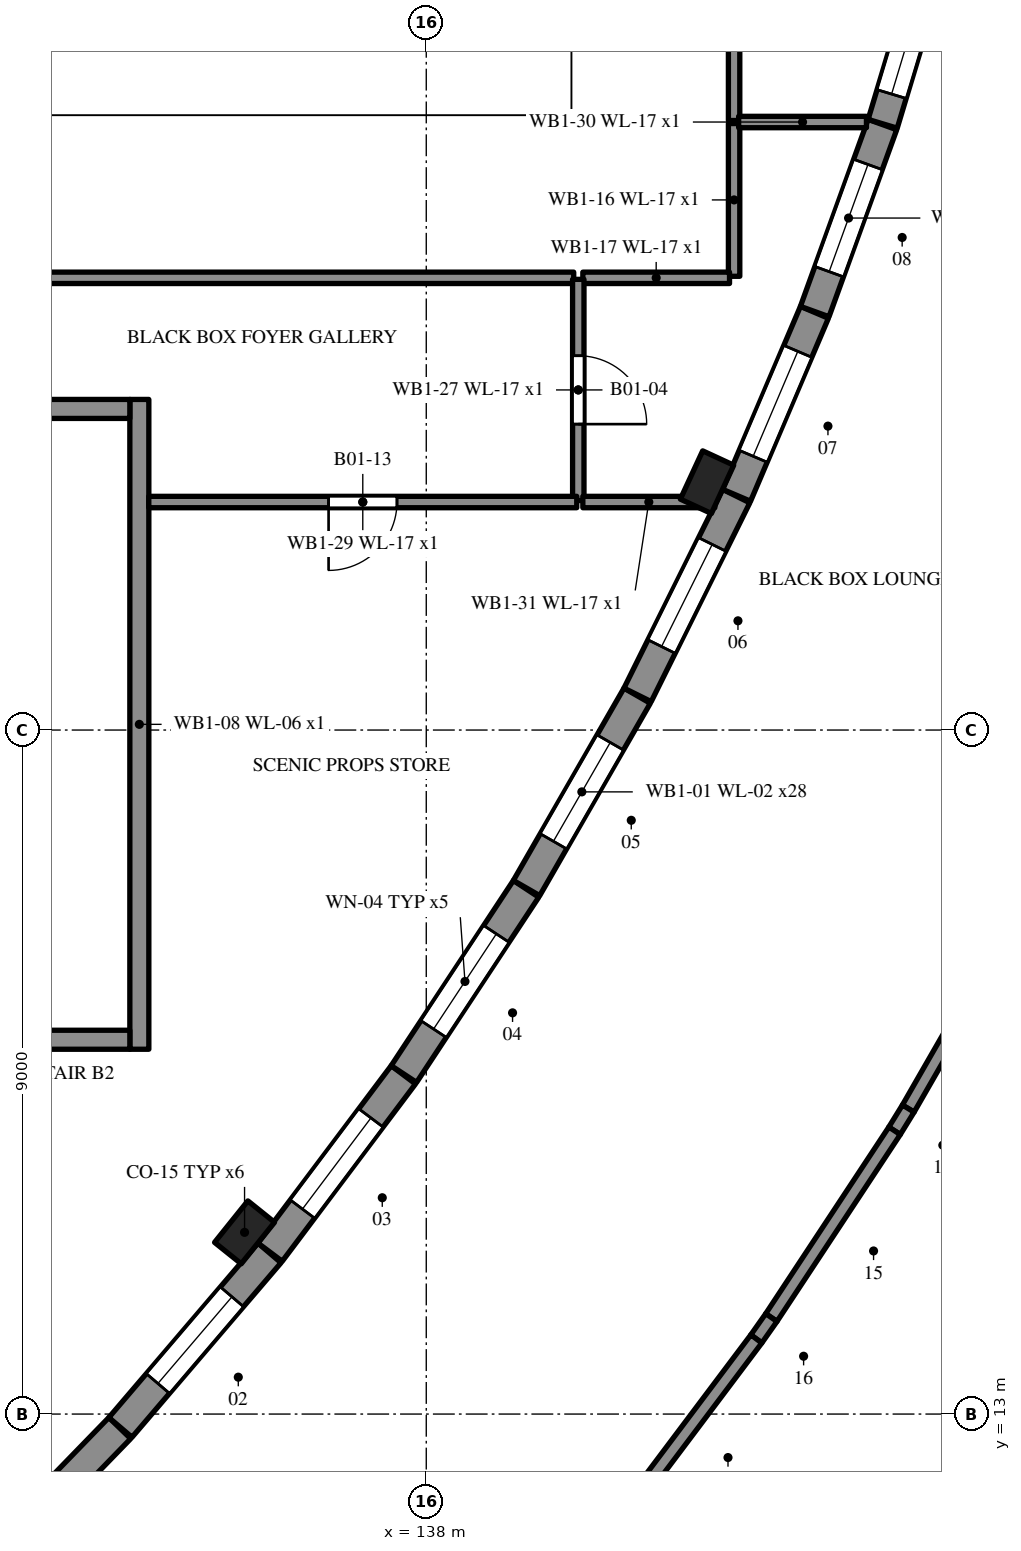
"""IFC4 building model, lengths in metres.
Left out: names, types, materials, properties, quantities, classifications, styles, units other than length and angle.
Written with IfcOpenShell. Run it as: python <this file> out.ifc"""

import sys

from ifc_helpers import new_model, si_unit, direction, frame, frame_2d, origin, origin_2d, place, context, subcontext, project, spatial, rectangle, extrude, element, fill, save


model = new_model("IFC4")
c1 = context("Model", 3, precision=1e-05, world=origin(), true_north=direction((0.0, 1.0)))
c2 = subcontext(c1, "Body", "Model", "MODEL_VIEW")
j1 = project(units=[si_unit("LENGTHUNIT", "METRE"), si_unit("PLANEANGLEUNIT", "RADIAN")], contexts=[c1])
p1 = place(None, origin())
s1 = spatial("IfcSite", under=j1, at=p1, CompositionType="ELEMENT")
p2 = place(p1, origin())
s2 = spatial("IfcBuilding", under=s1, at=p2, CompositionType="ELEMENT")
p3 = place(p2, frame((0.0, 0.0, 5.4)))
s3 = spatial("IfcBuildingStorey", under=s2, at=p3, CompositionType="ELEMENT", Elevation=5.4)
p4 = place(p3, frame((145.809, 19.572, 0.0), z_axis=(0.0, 0.0, 1.0), x_axis=(-0.498441518108, -0.866923325921, 0.0)))
e1 = element("IfcWall", 1, at=p4, inside=s3, PredefinedType="PARAPET", context=c2, shape_type="SweptSolid", body=[
    extrude(rectangle(XDim=2.944, YDim=0.18, at=frame_2d((1.472, 0.0))), origin(), (0.0, 0.0, 1.0), 0.7),
])
p5 = place(p3, frame((144.341, 17.02, 0.0), z_axis=(0.0, 0.0, 1.0), x_axis=(-0.52449389471, -0.851414208486, 0.0)))
e2 = element("IfcWall", 2, at=p5, inside=s3, PredefinedType="PARAPET", context=c2, shape_type="SweptSolid", body=[
    extrude(rectangle(XDim=0.344, YDim=0.18, at=frame_2d((0.172, 0.0))), origin(), (0.0, 0.0, 1.0), 0.7),
])
p6 = place(p3, frame((144.161, 16.727, 0.0), z_axis=(0.0, 0.0, 1.0), x_axis=(-0.550616879534, -0.834758079908, 0.0)))
e3 = element("IfcWall", 3, at=p6, inside=s3, PredefinedType="PARAPET", context=c2, shape_type="SweptSolid", body=[
    extrude(rectangle(XDim=2.944, YDim=0.18, at=frame_2d((1.472, 0.0))), origin(), (0.0, 0.0, 1.0), 0.7),
])
p7 = place(p3, frame((142.54, 14.27, 0.0), z_axis=(0.0, 0.0, 1.0), x_axis=(-0.576320440774, -0.817223806277, 0.0)))
e4 = element("IfcWall", 4, at=p7, inside=s3, PredefinedType="PARAPET", context=c2, shape_type="SweptSolid", body=[
    extrude(rectangle(XDim=0.344, YDim=0.18, at=frame_2d((0.172, 0.0))), origin(), (0.0, 0.0, 1.0), 0.7),
])
p8 = place(p3, frame((142.342, 13.989, 0.0), z_axis=(0.0, 0.0, 1.0), x_axis=(-0.600729616459, -0.799452267437, 0.0)))
e5 = element("IfcWall", 5, at=p8, inside=s3, PredefinedType="PARAPET", context=c2, shape_type="SweptSolid", body=[
    extrude(rectangle(XDim=2.944, YDim=0.18, at=frame_2d((1.472, 0.0))), origin(), (0.0, 0.0, 1.0), 0.7),
])
p9 = place(p3, frame((132.144, 10.935, 0.0), z_axis=(0.0, 0.0, 1.0), x_axis=(0.696353968975, 0.71769850905, 0.0)))
e6 = element("IfcWall", 6, at=p9, inside=s3, PredefinedType="SOLIDWALL", context=c2, shape_type="SweptSolid", body=[
    extrude(rectangle(XDim=2.619, YDim=0.4, at=frame_2d((1.31, 0.0))), origin(), (0.0, 0.0, 1.0), 4.8),
])
p10 = place(p3, frame((133.976, 12.824, 0.0), z_axis=(0.0, 0.0, 1.0), x_axis=(0.649458578854, 0.760396971557, 0.0)))
e7 = element("IfcWall", 7, at=p10, inside=s3, PredefinedType="SOLIDWALL", context=c2, shape_type="SweptSolid", body=[
    extrude(rectangle(XDim=3.019, YDim=0.4, at=frame_2d((1.51, 0.0))), origin(), (0.0, 0.0, 1.0), 4.8),
])
p11 = place(p10, frame((0.76, 0.0, 2.4)))
e8 = element("IfcOpeningElement", 8, at=p11, cuts=e7, PredefinedType="OPENING", context=c2, shape_type="SweptSolid", body=[
    extrude(rectangle(XDim=1.5, YDim=0.9, at=frame_2d((0.75, 0.45))), frame((0.0, 0.21, 0.0), z_axis=(0.0, -1.0, 0.0), x_axis=(1.0, 0.0, 0.0)), (0.0, 0.0, 1.0), 0.42),
])
p12 = place(p3, frame((135.945, 15.13, 0.0), z_axis=(0.0, 0.0, 1.0), x_axis=(0.600829330321, 0.799377330068, 0.0)))
e9 = element("IfcWall", 9, at=p12, inside=s3, PredefinedType="SOLIDWALL", context=c2, shape_type="SweptSolid", body=[
    extrude(rectangle(XDim=2.919, YDim=0.4, at=frame_2d((1.459, 0.0))), origin(), (0.0, 0.0, 1.0), 4.8),
])
p13 = place(p12, frame((0.71, 0.0, 2.4)))
e10 = element("IfcOpeningElement", 10, at=p13, cuts=e9, PredefinedType="OPENING", context=c2, shape_type="SweptSolid", body=[
    extrude(rectangle(XDim=1.5, YDim=0.9, at=frame_2d((0.75, 0.45))), frame((0.0, 0.21, 0.0), z_axis=(0.0, -1.0, 0.0), x_axis=(1.0, 0.0, 0.0)), (0.0, 0.0, 1.0), 0.42),
])
p14 = place(p3, frame((137.706, 17.474, 0.0), z_axis=(0.0, 0.0, 1.0), x_axis=(0.550602185206, 0.834767772285, 0.0)))
e11 = element("IfcWall", 11, at=p14, inside=s3, PredefinedType="SOLIDWALL", context=c2, shape_type="SweptSolid", body=[
    extrude(rectangle(XDim=2.919, YDim=0.4, at=frame_2d((1.46, 0.0))), origin(), (0.0, 0.0, 1.0), 4.8),
])
p15 = place(p14, frame((0.71, 0.0, 2.4)))
e12 = element("IfcOpeningElement", 12, at=p15, cuts=e11, PredefinedType="OPENING", context=c2, shape_type="SweptSolid", body=[
    extrude(rectangle(XDim=1.5, YDim=0.9, at=frame_2d((0.75, 0.45))), frame((0.0, 0.21, 0.0), z_axis=(0.0, -1.0, 0.0), x_axis=(1.0, 0.0, 0.0)), (0.0, 0.0, 1.0), 0.42),
])
p16 = place(p3, frame((139.319, 19.921, 0.0), z_axis=(0.0, 0.0, 1.0), x_axis=(0.498406705095, 0.866943340892, 0.0)))
e13 = element("IfcWall", 13, at=p16, inside=s3, PredefinedType="SOLIDWALL", context=c2, shape_type="SweptSolid", body=[
    extrude(rectangle(XDim=2.919, YDim=0.4, at=frame_2d((1.46, 0.0))), origin(), (0.0, 0.0, 1.0), 4.8),
])
p17 = place(p16, frame((0.71, 0.0, 2.4)))
e14 = element("IfcOpeningElement", 14, at=p17, cuts=e13, PredefinedType="OPENING", context=c2, shape_type="SweptSolid", body=[
    extrude(rectangle(XDim=1.5, YDim=0.9, at=frame_2d((0.75, 0.45))), frame((0.0, 0.21, 0.0), z_axis=(0.0, -1.0, 0.0), x_axis=(1.0, 0.0, 0.0)), (0.0, 0.0, 1.0), 0.42),
])
p18 = place(p3, frame((140.78, 22.463, 0.0), z_axis=(0.0, 0.0, 1.0), x_axis=(0.44433489597, 0.895860759395, 0.0)))
e15 = element("IfcWall", 15, at=p18, inside=s3, PredefinedType="SOLIDWALL", context=c2, shape_type="SweptSolid", body=[
    extrude(rectangle(XDim=2.92, YDim=0.4, at=frame_2d((1.46, 0.0))), origin(), (0.0, 0.0, 1.0), 4.8),
])
p19 = place(p18, frame((0.71, 0.0, 2.4)))
e16 = element("IfcOpeningElement", 16, at=p19, cuts=e15, PredefinedType="OPENING", context=c2, shape_type="SweptSolid", body=[
    extrude(rectangle(XDim=1.5, YDim=0.9, at=frame_2d((0.75, 0.45))), frame((0.0, 0.21, 0.0), z_axis=(0.0, -1.0, 0.0), x_axis=(1.0, 0.0, 0.0)), (0.0, 0.0, 1.0), 0.42),
])
p20 = place(p3, frame((142.083, 25.089, 0.0), z_axis=(0.0, 0.0, 1.0), x_axis=(0.391529943778, 0.920165367271, 0.0)))
e17 = element("IfcWall", 17, at=p20, inside=s3, PredefinedType="SOLIDWALL", context=c2, shape_type="SweptSolid", body=[
    extrude(rectangle(XDim=2.616, YDim=0.4, at=frame_2d((1.308, 0.0))), origin(), (0.0, 0.0, 1.0), 4.8),
])
p21 = place(p20, frame((0.558, 0.0, 0.9)))
e18 = element("IfcOpeningElement", 18, at=p21, cuts=e17, PredefinedType="OPENING", context=c2, shape_type="SweptSolid", body=[
    extrude(rectangle(XDim=1.5, YDim=2.1, at=frame_2d((0.75, 1.05))), frame((0.0, 0.21, 0.0), z_axis=(0.0, -1.0, 0.0), x_axis=(1.0, 0.0, 0.0)), (0.0, 0.0, 1.0), 0.42),
])
p22 = place(p3, frame((143.111, 27.506, 0.0), z_axis=(0.0, 0.0, 1.0), x_axis=(0.340394146267, 0.940282843184, 0.0)))
e19 = element("IfcWall", 19, at=p22, inside=s3, PredefinedType="SOLIDWALL", context=c2, shape_type="SweptSolid", body=[
    extrude(rectangle(XDim=2.616, YDim=0.4, at=frame_2d((1.308, 0.0))), origin(), (0.0, 0.0, 1.0), 4.8),
])
p23 = place(p22, frame((0.558, 0.0, 0.9)))
e20 = element("IfcOpeningElement", 20, at=p23, cuts=e19, PredefinedType="OPENING", context=c2, shape_type="SweptSolid", body=[
    extrude(rectangle(XDim=1.5, YDim=2.1, at=frame_2d((0.75, 1.05))), frame((0.0, 0.21, 0.0), z_axis=(0.0, -1.0, 0.0), x_axis=(1.0, 0.0, 0.0)), (0.0, 0.0, 1.0), 0.42),
])
p24 = place(p3, frame((144.005, 29.977, 0.0), z_axis=(0.0, 0.0, 1.0), x_axis=(0.288212317298, 0.957566530408, 0.0)))
e21 = element("IfcWall", 21, at=p24, inside=s3, PredefinedType="SOLIDWALL", context=c2, shape_type="SweptSolid", body=[
    extrude(rectangle(XDim=2.617, YDim=0.4, at=frame_2d((1.308, 0.0))), origin(), (0.0, 0.0, 1.0), 4.8),
])
p25 = place(p24, frame((0.408, 0.0, 0.9)))
e22 = element("IfcOpeningElement", 22, at=p25, cuts=e21, PredefinedType="OPENING", context=c2, shape_type="SweptSolid", body=[
    extrude(rectangle(XDim=1.8, YDim=2.1, at=frame_2d((0.9, 1.05))), frame((0.0, 0.21, 0.0), z_axis=(0.0, -1.0, 0.0), x_axis=(1.0, 0.0, 0.0)), (0.0, 0.0, 1.0), 0.42),
])
for number, where, z_axis, x_axis in (
    (23, (135.609, 15.391, 0.0), (0.0, 0.0, 1.0), (0.626, 0.78, 0.0)),
    (24, (141.694, 25.261, 0.0), (0.0, 0.0, 1.0), (0.42, 0.908, 0.0)),
):
    element("IfcColumn", number, at=place(p3, frame(where, z_axis=z_axis, x_axis=x_axis)), inside=s3, PredefinedType="PILASTER", context=c2, shape_type="SweptSolid", body=[
        extrude(rectangle(XDim=0.7, YDim=0.45, at=origin_2d()), origin(), (0.0, 0.0, 1.0), 4.8),
    ])
p26 = place(p3, frame((134.225, 17.8, 0.0), z_axis=(0.0, 0.0, 1.0), x_axis=(0.0, 1.0, 0.0)))
e25 = element("IfcWall", 25, at=p26, inside=s3, PredefinedType="SHEAR", context=c2, shape_type="SweptSolid", body=[
    extrude(rectangle(XDim=8.55, YDim=0.25, at=frame_2d((4.275, 0.0))), origin(), (0.0, 0.0, 1.0), 4.5),
])
p27 = place(p3, frame((134.1, 17.925, 0.0), z_axis=(0.0, 0.0, 1.0), x_axis=(-1.0, 0.0, 0.0)))
e26 = element("IfcWall", 26, at=p27, inside=s3, PredefinedType="SHEAR", context=c2, shape_type="SweptSolid", body=[
    extrude(rectangle(XDim=4.2, YDim=0.25, at=frame_2d((2.1, 0.0))), origin(), (0.0, 0.0, 1.0), 4.5),
])
p28 = place(p3, frame((129.9, 26.225, 0.0), z_axis=(0.0, 0.0, 1.0), x_axis=(1.0, 0.0, 0.0)))
e27 = element("IfcWall", 27, at=p28, inside=s3, PredefinedType="SHEAR", context=c2, shape_type="SweptSolid", body=[
    extrude(rectangle(XDim=4.2, YDim=0.25, at=frame_2d((2.1, 0.0))), origin(), (0.0, 0.0, 1.0), 4.5),
])
p29 = place(p28, frame((1.55, 0.0, 0.0)))
e28 = element("IfcOpeningElement", 28, at=p29, cuts=e27, PredefinedType="OPENING", context=c2, shape_type="SweptSolid", body=[
    extrude(rectangle(XDim=1.1, YDim=2.1, at=frame_2d((0.55, 1.05))), frame((0.0, 0.135, 0.0), z_axis=(0.0, -1.0, 0.0), x_axis=(1.0, 0.0, 0.0)), (0.0, 0.0, 1.0), 0.27),
])
p30 = place(p3, frame((139.94, 27.95, 0.0), z_axis=(0.0, 0.0, 1.0), x_axis=(-1.0, 0.0, 0.0)))
e29 = element("IfcWall", 29, at=p30, inside=s3, PredefinedType="PARTITIONING", context=c2, shape_type="SweptSolid", body=[
    extrude(rectangle(XDim=15.92, YDim=0.15, at=frame_2d((7.96, 0.0))), origin(), (0.0, 0.0, 1.0), 4.5),
])
p31 = place(p3, frame((142.05, 29.98, 0.0), z_axis=(0.0, 0.0, 1.0), x_axis=(0.0, -1.0, 0.0)))
e30 = element("IfcWall", 30, at=p31, inside=s3, PredefinedType="PARTITIONING", context=c2, shape_type="SweptSolid", body=[
    extrude(rectangle(XDim=2.01, YDim=0.15, at=frame_2d((1.005, 0.0))), origin(), (0.0, 0.0, 1.0), 4.5),
])
p32 = place(p3, frame((141.99, 27.95, 0.0), z_axis=(0.0, 0.0, 1.0), x_axis=(-1.0, 0.0, 0.0)))
e31 = element("IfcWall", 31, at=p32, inside=s3, PredefinedType="PARTITIONING", context=c2, shape_type="SweptSolid", body=[
    extrude(rectangle(XDim=1.93, YDim=0.15, at=frame_2d((0.965, 0.0))), origin(), (0.0, 0.0, 1.0), 4.5),
])
p33 = place(p3, frame((142.05, 36.98, 0.0), z_axis=(0.0, 0.0, 1.0), x_axis=(0.0, -1.0, 0.0)))
e32 = element("IfcWall", 32, at=p33, inside=s3, PredefinedType="PARTITIONING", context=c2, shape_type="SweptSolid", body=[
    extrude(rectangle(XDim=6.96, YDim=0.15, at=frame_2d((3.48, 0.0))), origin(), (0.0, 0.0, 1.0), 4.5),
])
p34 = place(p33, frame((3.03, 0.0, 0.0)))
e33 = element("IfcOpeningElement", 33, at=p34, cuts=e32, PredefinedType="OPENING", context=c2, shape_type="SweptSolid", body=[
    extrude(rectangle(XDim=0.9, YDim=2.1, at=frame_2d((0.45, 1.05))), frame((0.0, 0.085, 0.0), z_axis=(0.0, -1.0, 0.0), x_axis=(1.0, 0.0, 0.0)), (0.0, 0.0, 1.0), 0.17),
])
p35 = place(p3, frame((140.0, 27.93, 0.0), z_axis=(0.0, 0.0, 1.0), x_axis=(0.0, -1.0, 0.0)))
e34 = element("IfcWall", 34, at=p35, inside=s3, PredefinedType="PARTITIONING", context=c2, shape_type="SweptSolid", body=[
    extrude(rectangle(XDim=2.91, YDim=0.15, at=frame_2d((1.455, 0.0))), origin(), (0.0, 0.0, 1.0), 4.5),
])
p36 = place(p35, frame((1.005, 0.0, 0.0)))
e35 = element("IfcOpeningElement", 35, at=p36, cuts=e34, PredefinedType="OPENING", context=c2, shape_type="SweptSolid", body=[
    extrude(rectangle(XDim=0.9, YDim=2.1, at=frame_2d((0.45, 1.05))), frame((0.0, 0.085, 0.0), z_axis=(0.0, -1.0, 0.0), x_axis=(1.0, 0.0, 0.0)), (0.0, 0.0, 1.0), 0.17),
])
p37 = place(p3, frame((139.98, 25.0, 0.0), z_axis=(0.0, 0.0, 1.0), x_axis=(-1.0, 0.0, 0.0)))
e36 = element("IfcWall", 36, at=p37, inside=s3, PredefinedType="PARTITIONING", context=c2, shape_type="SweptSolid", body=[
    extrude(rectangle(XDim=5.63, YDim=0.15, at=frame_2d((2.815, 0.0))), origin(), (0.0, 0.0, 1.0), 4.5),
])
p38 = place(p37, frame((2.365, 0.0, 0.0)))
e37 = element("IfcOpeningElement", 37, at=p38, cuts=e36, PredefinedType="OPENING", context=c2, shape_type="SweptSolid", body=[
    extrude(rectangle(XDim=0.9, YDim=2.1, at=frame_2d((0.45, 1.05))), frame((0.0, 0.085, 0.0), z_axis=(0.0, -1.0, 0.0), x_axis=(1.0, 0.0, 0.0)), (0.0, 0.0, 1.0), 0.17),
])
p39 = place(p3, frame((142.11, 30.0, 0.0), z_axis=(0.0, 0.0, 1.0), x_axis=(1.0, 0.0, 0.0)))
e38 = element("IfcWall", 38, at=p39, inside=s3, PredefinedType="PARTITIONING", context=c2, shape_type="SweptSolid", body=[
    extrude(rectangle(XDim=1.681, YDim=0.15, at=frame_2d((0.841, 0.0))), origin(), (0.0, 0.0, 1.0), 4.5),
])
p40 = place(p3, frame((141.796, 25.0, 0.0), z_axis=(0.0, 0.0, 1.0), x_axis=(-1.0, 0.0, 0.0)))
e39 = element("IfcWall", 39, at=p40, inside=s3, PredefinedType="PARTITIONING", context=c2, shape_type="SweptSolid", body=[
    extrude(rectangle(XDim=1.736, YDim=0.15, at=frame_2d((0.868, 0.0))), origin(), (0.0, 0.0, 1.0), 4.5),
])
p41 = place(p11, origin())
e40 = element("IfcWindow", 40, at=p41, inside=s3, PartitioningType="SINGLE_PANEL", PredefinedType="WINDOW", context=c2, shape_type="SweptSolid", body=[
    extrude(rectangle(XDim=1.5, YDim=0.9, at=frame_2d((0.75, 0.45))), frame((0.0, 0.03, 0.0), z_axis=(0.0, -1.0, 0.0), x_axis=(1.0, 0.0, 0.0)), (0.0, 0.0, 1.0), 0.06),
])
fill(e8, e40)
p42 = place(p13, origin())
e41 = element("IfcWindow", 41, at=p42, inside=s3, PartitioningType="SINGLE_PANEL", PredefinedType="WINDOW", context=c2, shape_type="SweptSolid", body=[
    extrude(rectangle(XDim=1.5, YDim=0.9, at=frame_2d((0.75, 0.45))), frame((0.0, 0.03, 0.0), z_axis=(0.0, -1.0, 0.0), x_axis=(1.0, 0.0, 0.0)), (0.0, 0.0, 1.0), 0.06),
])
fill(e10, e41)
p43 = place(p15, origin())
e42 = element("IfcWindow", 42, at=p43, inside=s3, PartitioningType="SINGLE_PANEL", PredefinedType="WINDOW", context=c2, shape_type="SweptSolid", body=[
    extrude(rectangle(XDim=1.5, YDim=0.9, at=frame_2d((0.75, 0.45))), frame((0.0, 0.03, 0.0), z_axis=(0.0, -1.0, 0.0), x_axis=(1.0, 0.0, 0.0)), (0.0, 0.0, 1.0), 0.06),
])
fill(e12, e42)
p44 = place(p17, origin())
e43 = element("IfcWindow", 43, at=p44, inside=s3, PartitioningType="SINGLE_PANEL", PredefinedType="WINDOW", context=c2, shape_type="SweptSolid", body=[
    extrude(rectangle(XDim=1.5, YDim=0.9, at=frame_2d((0.75, 0.45))), frame((0.0, 0.03, 0.0), z_axis=(0.0, -1.0, 0.0), x_axis=(1.0, 0.0, 0.0)), (0.0, 0.0, 1.0), 0.06),
])
fill(e14, e43)
p45 = place(p19, origin())
e44 = element("IfcWindow", 44, at=p45, inside=s3, PartitioningType="SINGLE_PANEL", PredefinedType="WINDOW", context=c2, shape_type="SweptSolid", body=[
    extrude(rectangle(XDim=1.5, YDim=0.9, at=frame_2d((0.75, 0.45))), frame((0.0, 0.03, 0.0), z_axis=(0.0, -1.0, 0.0), x_axis=(1.0, 0.0, 0.0)), (0.0, 0.0, 1.0), 0.06),
])
fill(e16, e44)
p46 = place(p21, origin())
e45 = element("IfcWindow", 45, at=p46, inside=s3, PartitioningType="SINGLE_PANEL", PredefinedType="WINDOW", context=c2, shape_type="SweptSolid", body=[
    extrude(rectangle(XDim=1.5, YDim=2.1, at=frame_2d((0.75, 1.05))), frame((0.0, 0.03, 0.0), z_axis=(0.0, -1.0, 0.0), x_axis=(1.0, 0.0, 0.0)), (0.0, 0.0, 1.0), 0.06),
])
fill(e18, e45)
p47 = place(p23, origin())
e46 = element("IfcWindow", 46, at=p47, inside=s3, PartitioningType="SINGLE_PANEL", PredefinedType="WINDOW", context=c2, shape_type="SweptSolid", body=[
    extrude(rectangle(XDim=1.5, YDim=2.1, at=frame_2d((0.75, 1.05))), frame((0.0, 0.03, 0.0), z_axis=(0.0, -1.0, 0.0), x_axis=(1.0, 0.0, 0.0)), (0.0, 0.0, 1.0), 0.06),
])
fill(e20, e46)
p48 = place(p25, origin())
e47 = element("IfcWindow", 47, at=p48, inside=s3, PartitioningType="SINGLE_PANEL", PredefinedType="WINDOW", context=c2, shape_type="SweptSolid", body=[
    extrude(rectangle(XDim=1.8, YDim=2.1, at=frame_2d((0.9, 1.05))), frame((0.0, 0.03, 0.0), z_axis=(0.0, -1.0, 0.0), x_axis=(1.0, 0.0, 0.0)), (0.0, 0.0, 1.0), 0.06),
])
fill(e22, e47)
p49 = place(p36, origin())
e48 = element("IfcDoor", 48, at=p49, inside=s3, OperationType="SINGLE_SWING_RIGHT", PredefinedType="DOOR", context=c2, shape_type="SweptSolid", body=[
    extrude(rectangle(XDim=0.9, YDim=2.1, at=frame_2d((0.45, 1.05))), frame((0.0, 0.025, 0.0), z_axis=(0.0, -1.0, 0.0), x_axis=(1.0, 0.0, 0.0)), (0.0, 0.0, 1.0), 0.05),
])
fill(e35, e48)
p50 = place(p38, origin())
e49 = element("IfcDoor", 49, at=p50, inside=s3, OperationType="SINGLE_SWING_RIGHT", PredefinedType="DOOR", context=c2, shape_type="SweptSolid", body=[
    extrude(rectangle(XDim=0.9, YDim=2.1, at=frame_2d((0.45, 1.05))), frame((0.0, 0.025, 0.0), z_axis=(0.0, -1.0, 0.0), x_axis=(1.0, 0.0, 0.0)), (0.0, 0.0, 1.0), 0.05),
])
fill(e37, e49)
save(model, sys.argv[1])
